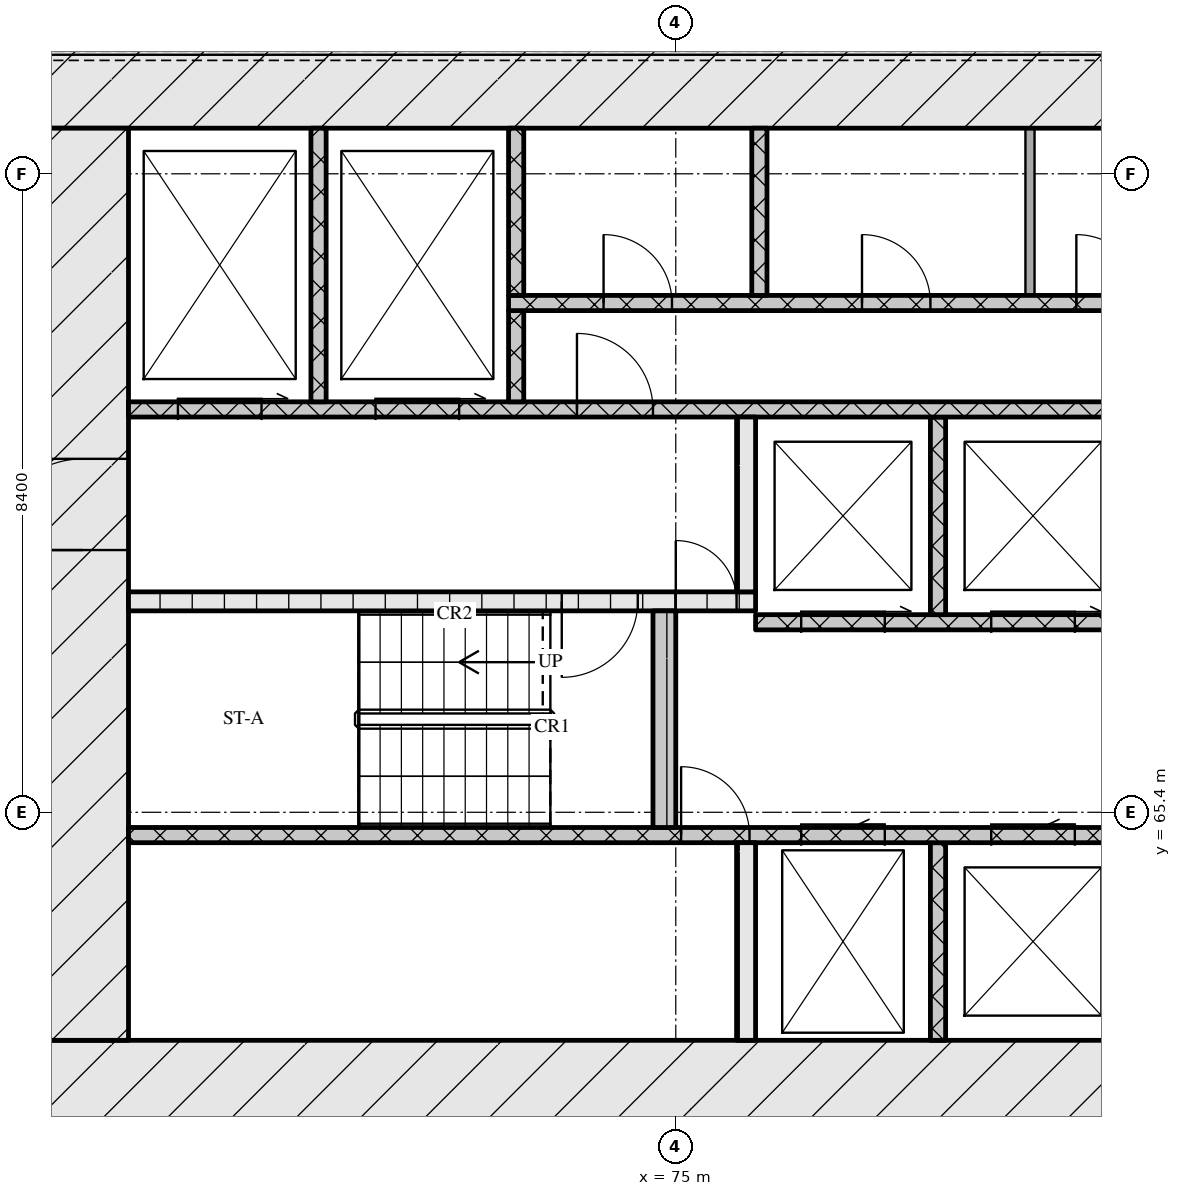
"""IFC4 building model, lengths in metres.
Left out: names, types, materials, properties, quantities, classifications, styles, units other than length and angle.
Written with IfcOpenShell. Run it as: python <this file> out.ifc"""

import sys

from ifc_helpers import new_model, si_unit, direction, frame, frame_2d, origin, place, context, subcontext, project, spatial, rectangle, extrude, element, fill, save


model = new_model("IFC4")
c1 = context("Model", 3, precision=1e-05, world=origin(), true_north=direction((0.0, 1.0)))
c2 = subcontext(c1, "Body", "Model", "MODEL_VIEW")
j1 = project(units=[si_unit("LENGTHUNIT", "METRE"), si_unit("PLANEANGLEUNIT", "RADIAN")], contexts=[c1])
p1 = place(None, origin())
s1 = spatial("IfcSite", under=j1, at=p1, CompositionType="ELEMENT")
p2 = place(p1, origin())
s2 = spatial("IfcBuilding", under=s1, at=p2, CompositionType="ELEMENT")
p3 = place(p2, frame((0.0, 0.0, 55.2)))
s3 = spatial("IfcBuildingStorey", under=s2, at=p3, CompositionType="ELEMENT", Elevation=55.2)
p4 = place(p3, frame((66.6, 61.8, 0.0), z_axis=(0.0, 0.0, 1.0), x_axis=(1.0, 0.0, 0.0)))
e1 = element("IfcWall", 1, at=p4, inside=s3, PredefinedType="SOLIDWALL", context=c2, shape_type="SweptSolid", body=[
    extrude(rectangle(XDim=42.0, YDim=1.2, at=frame_2d((21.0, 0.0))), origin(), (0.0, 0.0, 1.0), 3.32),
])
p5 = place(p4, frame((21.35, 0.0, 0.0)))
e2 = element("IfcOpeningElement", 2, at=p5, cuts=e1, PredefinedType="OPENING", context=c2, shape_type="SweptSolid", body=[
    extrude(rectangle(XDim=1.8, YDim=2.1, at=frame_2d((0.9, 1.05))), frame((0.0, 0.61, 0.0), z_axis=(0.0, -1.0, 0.0), x_axis=(1.0, 0.0, 0.0)), (0.0, 0.0, 1.0), 1.22),
])
p6 = place(p3, frame((66.6, 75.0, 0.0), z_axis=(0.0, 0.0, 1.0), x_axis=(1.0, 0.0, 0.0)))
e3 = element("IfcWall", 3, at=p6, inside=s3, PredefinedType="SOLIDWALL", context=c2, shape_type="SweptSolid", body=[
    extrude(rectangle(XDim=42.0, YDim=1.2, at=frame_2d((21.0, 0.0))), origin(), (0.0, 0.0, 1.0), 3.32),
])
p7 = place(p3, frame((67.2, 62.4, 0.0), z_axis=(0.0, 0.0, 1.0), x_axis=(0.0, 1.0, 0.0)))
e4 = element("IfcWall", 4, at=p7, inside=s3, PredefinedType="SOLIDWALL", context=c2, shape_type="SweptSolid", body=[
    extrude(rectangle(XDim=12.0, YDim=1.2, at=frame_2d((6.0, 0.0))), origin(), (0.0, 0.0, 1.0), 3.32),
])
p8 = place(p7, frame((6.45, 0.0, 0.0)))
e5 = element("IfcOpeningElement", 5, at=p8, cuts=e4, PredefinedType="OPENING", context=c2, shape_type="SweptSolid", body=[
    extrude(rectangle(XDim=1.2, YDim=2.1, at=frame_2d((0.6, 1.05))), frame((0.0, 0.61, 0.0), z_axis=(0.0, -1.0, 0.0), x_axis=(1.0, 0.0, 0.0)), (0.0, 0.0, 1.0), 1.22),
])
p9 = place(p3, frame((75.925, 62.4, 0.0), z_axis=(0.0, 0.0, 1.0), x_axis=(0.0, 1.0, 0.0)))
e6 = element("IfcWall", 6, at=p9, inside=s3, PredefinedType="SOLIDWALL", context=c2, shape_type="SweptSolid", body=[
    extrude(rectangle(XDim=2.6, YDim=0.25, at=frame_2d((1.3, 0.0))), origin(), (0.0, 0.0, 1.0), 3.32),
])
p10 = place(p3, frame((78.45, 62.4, 0.0), z_axis=(0.0, 0.0, 1.0), x_axis=(0.0, 1.0, 0.0)))
e7 = element("IfcWall", 7, at=p10, inside=s3, PredefinedType="SOLIDWALL", context=c2, shape_type="SweptSolid", body=[
    extrude(rectangle(XDim=2.6, YDim=0.2, at=frame_2d((1.3, 0.0))), origin(), (0.0, 0.0, 1.0), 3.32),
])
p11 = place(p3, frame((67.8, 65.1, 0.0), z_axis=(0.0, 0.0, 1.0), x_axis=(1.0, 0.0, 0.0)))
e8 = element("IfcWall", 8, at=p11, inside=s3, PredefinedType="SOLIDWALL", context=c2, shape_type="SweptSolid", body=[
    extrude(rectangle(XDim=18.5, YDim=0.2, at=frame_2d((9.25, 0.0))), origin(), (0.0, 0.0, 1.0), 3.32),
])
p12 = place(p11, frame((7.27, 0.0, 0.0)))
e9 = element("IfcOpeningElement", 9, at=p12, cuts=e8, PredefinedType="OPENING", context=c2, shape_type="SweptSolid", body=[
    extrude(rectangle(XDim=0.9, YDim=2.1, at=frame_2d((0.45, 1.05))), frame((0.0, 0.11, 0.0), z_axis=(0.0, -1.0, 0.0), x_axis=(1.0, 0.0, 0.0)), (0.0, 0.0, 1.0), 0.22),
])
p13 = place(p11, frame((8.85, 0.0, 0.0)))
e10 = element("IfcOpeningElement", 10, at=p13, cuts=e8, PredefinedType="OPENING", context=c2, shape_type="SweptSolid", body=[
    extrude(rectangle(XDim=1.1, YDim=2.1, at=frame_2d((0.55, 1.05))), frame((0.0, 0.11, 0.0), z_axis=(0.0, -1.0, 0.0), x_axis=(1.0, 0.0, 0.0)), (0.0, 0.0, 1.0), 0.22),
])
p14 = place(p11, frame((11.35, 0.0, 0.0)))
e11 = element("IfcOpeningElement", 11, at=p14, cuts=e8, PredefinedType="OPENING", context=c2, shape_type="SweptSolid", body=[
    extrude(rectangle(XDim=1.1, YDim=2.1, at=frame_2d((0.55, 1.05))), frame((0.0, 0.11, 0.0), z_axis=(0.0, -1.0, 0.0), x_axis=(1.0, 0.0, 0.0)), (0.0, 0.0, 1.0), 0.22),
])
p15 = place(p11, frame((13.85, 0.0, 0.0)))
e12 = element("IfcOpeningElement", 12, at=p15, cuts=e8, PredefinedType="OPENING", context=c2, shape_type="SweptSolid", body=[
    extrude(rectangle(XDim=1.1, YDim=2.1, at=frame_2d((0.55, 1.05))), frame((0.0, 0.11, 0.0), z_axis=(0.0, -1.0, 0.0), x_axis=(1.0, 0.0, 0.0)), (0.0, 0.0, 1.0), 0.22),
])
p16 = place(p11, frame((16.7, 0.0, 0.0)))
e13 = element("IfcOpeningElement", 13, at=p16, cuts=e8, PredefinedType="OPENING", context=c2, shape_type="SweptSolid", body=[
    extrude(rectangle(XDim=0.9, YDim=2.1, at=frame_2d((0.45, 1.05))), frame((0.0, 0.11, 0.0), z_axis=(0.0, -1.0, 0.0), x_axis=(1.0, 0.0, 0.0)), (0.0, 0.0, 1.0), 0.22),
])
p17 = place(p3, frame((74.85, 65.2, 0.0), z_axis=(0.0, 0.0, 1.0), x_axis=(0.0, 1.0, 0.0)))
e14 = element("IfcWall", 14, at=p17, inside=s3, PredefinedType="SOLIDWALL", context=c2, shape_type="SweptSolid", body=[
    extrude(rectangle(XDim=2.85, YDim=0.3, at=frame_2d((1.425, 0.0))), origin(), (0.0, 0.0, 1.0), 3.32),
])
p18 = place(p3, frame((76.05, 67.9, 0.0), z_axis=(0.0, 0.0, 1.0), x_axis=(1.0, 0.0, 0.0)))
e15 = element("IfcWall", 15, at=p18, inside=s3, PredefinedType="SOLIDWALL", context=c2, shape_type="SweptSolid", body=[
    extrude(rectangle(XDim=23.1, YDim=0.2, at=frame_2d((11.55, 0.0))), origin(), (0.0, 0.0, 1.0), 3.32),
])
p19 = place(p18, frame((0.6, 0.0, 0.0)))
e16 = element("IfcOpeningElement", 16, at=p19, cuts=e15, PredefinedType="OPENING", context=c2, shape_type="SweptSolid", body=[
    extrude(rectangle(XDim=1.1, YDim=2.1, at=frame_2d((0.55, 1.05))), frame((0.0, 0.11, 0.0), z_axis=(0.0, -1.0, 0.0), x_axis=(1.0, 0.0, 0.0)), (0.0, 0.0, 1.0), 0.22),
])
p20 = place(p18, frame((3.1, 0.0, 0.0)))
e17 = element("IfcOpeningElement", 17, at=p20, cuts=e15, PredefinedType="OPENING", context=c2, shape_type="SweptSolid", body=[
    extrude(rectangle(XDim=1.1, YDim=2.1, at=frame_2d((0.55, 1.05))), frame((0.0, 0.11, 0.0), z_axis=(0.0, -1.0, 0.0), x_axis=(1.0, 0.0, 0.0)), (0.0, 0.0, 1.0), 0.22),
])
p21 = place(p18, frame((5.6, 0.0, 0.0)))
e18 = element("IfcOpeningElement", 18, at=p21, cuts=e15, PredefinedType="OPENING", context=c2, shape_type="SweptSolid", body=[
    extrude(rectangle(XDim=1.1, YDim=2.1, at=frame_2d((0.55, 1.05))), frame((0.0, 0.11, 0.0), z_axis=(0.0, -1.0, 0.0), x_axis=(1.0, 0.0, 0.0)), (0.0, 0.0, 1.0), 0.22),
])
p22 = place(p18, frame((9.7, 0.0, 0.0)))
e19 = element("IfcOpeningElement", 19, at=p22, cuts=e15, PredefinedType="OPENING", context=c2, shape_type="SweptSolid", body=[
    extrude(rectangle(XDim=0.9, YDim=2.1, at=frame_2d((0.45, 1.05))), frame((0.0, 0.11, 0.0), z_axis=(0.0, -1.0, 0.0), x_axis=(1.0, 0.0, 0.0)), (0.0, 0.0, 1.0), 0.22),
])
p23 = place(p18, frame((13.55, 0.0, 0.0)))
e20 = element("IfcOpeningElement", 20, at=p23, cuts=e15, PredefinedType="OPENING", context=c2, shape_type="SweptSolid", body=[
    extrude(rectangle(XDim=1.0, YDim=2.1, at=frame_2d((0.5, 1.05))), frame((0.0, 0.11, 0.0), z_axis=(0.0, -1.0, 0.0), x_axis=(1.0, 0.0, 0.0)), (0.0, 0.0, 1.0), 0.22),
])
p24 = place(p3, frame((78.45, 68.0, 0.0), z_axis=(0.0, 0.0, 1.0), x_axis=(0.0, 1.0, 0.0)))
e21 = element("IfcWall", 21, at=p24, inside=s3, PredefinedType="SOLIDWALL", context=c2, shape_type="SweptSolid", body=[
    extrude(rectangle(XDim=2.6, YDim=0.2, at=frame_2d((1.3, 0.0))), origin(), (0.0, 0.0, 1.0), 3.32),
])
p25 = place(p3, frame((67.8, 68.175, 0.0), z_axis=(0.0, 0.0, 1.0), x_axis=(1.0, 0.0, 0.0)))
e22 = element("IfcWall", 22, at=p25, inside=s3, PredefinedType="SOLIDWALL", context=c2, shape_type="SweptSolid", body=[
    extrude(rectangle(XDim=8.25, YDim=0.25, at=frame_2d((4.125, 0.0))), origin(), (0.0, 0.0, 1.0), 3.32),
])
p26 = place(p25, frame((5.7, 0.0, 0.0)))
e23 = element("IfcOpeningElement", 23, at=p26, cuts=e22, PredefinedType="OPENING", context=c2, shape_type="SweptSolid", body=[
    extrude(rectangle(XDim=1.0, YDim=2.1, at=frame_2d((0.5, 1.05))), frame((0.0, 0.135, 0.0), z_axis=(0.0, -1.0, 0.0), x_axis=(1.0, 0.0, 0.0)), (0.0, 0.0, 1.0), 0.27),
])
p27 = place(p25, frame((7.2, 0.0, 0.0)))
e24 = element("IfcOpeningElement", 24, at=p27, cuts=e22, PredefinedType="OPENING", context=c2, shape_type="SweptSolid", body=[
    extrude(rectangle(XDim=0.8, YDim=2.1, at=frame_2d((0.4, 1.05))), frame((0.0, 0.135, 0.0), z_axis=(0.0, -1.0, 0.0), x_axis=(1.0, 0.0, 0.0)), (0.0, 0.0, 1.0), 0.27),
])
p28 = place(p3, frame((75.925, 68.3, 0.0), z_axis=(0.0, 0.0, 1.0), x_axis=(0.0, 1.0, 0.0)))
e25 = element("IfcWall", 25, at=p28, inside=s3, PredefinedType="SOLIDWALL", context=c2, shape_type="SweptSolid", body=[
    extrude(rectangle(XDim=2.3, YDim=0.25, at=frame_2d((1.15, 0.0))), origin(), (0.0, 0.0, 1.0), 3.32),
])
p29 = place(p3, frame((67.8, 70.7, 0.0), z_axis=(0.0, 0.0, 1.0), x_axis=(1.0, 0.0, 0.0)))
e26 = element("IfcWall", 26, at=p29, inside=s3, PredefinedType="SOLIDWALL", context=c2, shape_type="SweptSolid", body=[
    extrude(rectangle(XDim=39.6, YDim=0.2, at=frame_2d((19.8, 0.0))), origin(), (0.0, 0.0, 1.0), 3.32),
])
p30 = place(p29, frame((0.65, 0.0, 0.0)))
e27 = element("IfcOpeningElement", 27, at=p30, cuts=e26, PredefinedType="OPENING", context=c2, shape_type="SweptSolid", body=[
    extrude(rectangle(XDim=1.1, YDim=2.1, at=frame_2d((0.55, 1.05))), frame((0.0, 0.11, 0.0), z_axis=(0.0, -1.0, 0.0), x_axis=(1.0, 0.0, 0.0)), (0.0, 0.0, 1.0), 0.22),
])
p31 = place(p29, frame((3.25, 0.0, 0.0)))
e28 = element("IfcOpeningElement", 28, at=p31, cuts=e26, PredefinedType="OPENING", context=c2, shape_type="SweptSolid", body=[
    extrude(rectangle(XDim=1.1, YDim=2.1, at=frame_2d((0.55, 1.05))), frame((0.0, 0.11, 0.0), z_axis=(0.0, -1.0, 0.0), x_axis=(1.0, 0.0, 0.0)), (0.0, 0.0, 1.0), 0.22),
])
p32 = place(p29, frame((5.9, 0.0, 0.0)))
e29 = element("IfcOpeningElement", 29, at=p32, cuts=e26, PredefinedType="OPENING", context=c2, shape_type="SweptSolid", body=[
    extrude(rectangle(XDim=1.0, YDim=2.1, at=frame_2d((0.5, 1.05))), frame((0.0, 0.11, 0.0), z_axis=(0.0, -1.0, 0.0), x_axis=(1.0, 0.0, 0.0)), (0.0, 0.0, 1.0), 0.22),
])
p33 = place(p29, frame((21.7, 0.0, 0.0)))
e30 = element("IfcOpeningElement", 30, at=p33, cuts=e26, PredefinedType="OPENING", context=c2, shape_type="SweptSolid", body=[
    extrude(rectangle(XDim=1.0, YDim=2.1, at=frame_2d((0.5, 1.05))), frame((0.0, 0.11, 0.0), z_axis=(0.0, -1.0, 0.0), x_axis=(1.0, 0.0, 0.0)), (0.0, 0.0, 1.0), 0.22),
])
p34 = place(p29, frame((32.7, 0.0, 0.0)))
e31 = element("IfcOpeningElement", 31, at=p34, cuts=e26, PredefinedType="OPENING", context=c2, shape_type="SweptSolid", body=[
    extrude(rectangle(XDim=1.0, YDim=2.1, at=frame_2d((0.5, 1.05))), frame((0.0, 0.11, 0.0), z_axis=(0.0, -1.0, 0.0), x_axis=(1.0, 0.0, 0.0)), (0.0, 0.0, 1.0), 0.22),
])
p35 = place(p29, frame((35.25, 0.0, 0.0)))
e32 = element("IfcOpeningElement", 32, at=p35, cuts=e26, PredefinedType="OPENING", context=c2, shape_type="SweptSolid", body=[
    extrude(rectangle(XDim=1.1, YDim=2.1, at=frame_2d((0.55, 1.05))), frame((0.0, 0.11, 0.0), z_axis=(0.0, -1.0, 0.0), x_axis=(1.0, 0.0, 0.0)), (0.0, 0.0, 1.0), 0.22),
])
p36 = place(p29, frame((37.85, 0.0, 0.0)))
e33 = element("IfcOpeningElement", 33, at=p36, cuts=e26, PredefinedType="OPENING", context=c2, shape_type="SweptSolid", body=[
    extrude(rectangle(XDim=1.1, YDim=2.1, at=frame_2d((0.55, 1.05))), frame((0.0, 0.11, 0.0), z_axis=(0.0, -1.0, 0.0), x_axis=(1.0, 0.0, 0.0)), (0.0, 0.0, 1.0), 0.22),
])
p37 = place(p3, frame((70.3, 70.8, 0.0), z_axis=(0.0, 0.0, 1.0), x_axis=(0.0, 1.0, 0.0)))
e34 = element("IfcWall", 34, at=p37, inside=s3, PredefinedType="SOLIDWALL", context=c2, shape_type="SweptSolid", body=[
    extrude(rectangle(XDim=3.6, YDim=0.2, at=frame_2d((1.8, 0.0))), origin(), (0.0, 0.0, 1.0), 3.32),
])
p38 = place(p3, frame((72.9, 70.8, 0.0), z_axis=(0.0, 0.0, 1.0), x_axis=(0.0, 1.0, 0.0)))
e35 = element("IfcWall", 35, at=p38, inside=s3, PredefinedType="SOLIDWALL", context=c2, shape_type="SweptSolid", body=[
    extrude(rectangle(XDim=1.2, YDim=0.2, at=frame_2d((0.6, 0.0))), origin(), (0.0, 0.0, 1.0), 3.32),
])
p39 = place(p3, frame((72.8, 72.1, 0.0), z_axis=(0.0, 0.0, 1.0), x_axis=(1.0, 0.0, 0.0)))
e36 = element("IfcWall", 36, at=p39, inside=s3, PredefinedType="SOLIDWALL", context=c2, shape_type="SweptSolid", body=[
    extrude(rectangle(XDim=11.0, YDim=0.2, at=frame_2d((5.5, 0.0))), origin(), (0.0, 0.0, 1.0), 3.32),
])
p40 = place(p39, frame((1.25, 0.0, 0.0)))
e37 = element("IfcOpeningElement", 37, at=p40, cuts=e36, PredefinedType="OPENING", context=c2, shape_type="SweptSolid", body=[
    extrude(rectangle(XDim=0.9, YDim=2.1, at=frame_2d((0.45, 1.05))), frame((0.0, 0.11, 0.0), z_axis=(0.0, -1.0, 0.0), x_axis=(1.0, 0.0, 0.0)), (0.0, 0.0, 1.0), 0.22),
])
p41 = place(p39, frame((4.65, 0.0, 0.0)))
e38 = element("IfcOpeningElement", 38, at=p41, cuts=e36, PredefinedType="OPENING", context=c2, shape_type="SweptSolid", body=[
    extrude(rectangle(XDim=0.9, YDim=2.1, at=frame_2d((0.45, 1.05))), frame((0.0, 0.11, 0.0), z_axis=(0.0, -1.0, 0.0), x_axis=(1.0, 0.0, 0.0)), (0.0, 0.0, 1.0), 0.22),
])
p42 = place(p39, frame((7.47, 0.0, 0.0)))
e39 = element("IfcOpeningElement", 39, at=p42, cuts=e36, PredefinedType="OPENING", context=c2, shape_type="SweptSolid", body=[
    extrude(rectangle(XDim=0.9, YDim=2.1, at=frame_2d((0.45, 1.05))), frame((0.0, 0.11, 0.0), z_axis=(0.0, -1.0, 0.0), x_axis=(1.0, 0.0, 0.0)), (0.0, 0.0, 1.0), 0.22),
])
p43 = place(p39, frame((9.445, 0.0, 0.0)))
e40 = element("IfcOpeningElement", 40, at=p43, cuts=e36, PredefinedType="OPENING", context=c2, shape_type="SweptSolid", body=[
    extrude(rectangle(XDim=0.9, YDim=2.1, at=frame_2d((0.45, 1.05))), frame((0.0, 0.11, 0.0), z_axis=(0.0, -1.0, 0.0), x_axis=(1.0, 0.0, 0.0)), (0.0, 0.0, 1.0), 0.22),
])
for number, where, z_axis, x_axis in (
    (41, (72.9, 72.2, 0.0), (0.0, 0.0, 1.0), (0.0, 1.0, 0.0)),
    (42, (76.1, 72.2, 0.0), (0.0, 0.0, 1.0), (0.0, 1.0, 0.0)),
):
    element("IfcWall", number, at=place(p3, frame(where, z_axis=z_axis, x_axis=x_axis)), inside=s3, PredefinedType="SOLIDWALL", context=c2, shape_type="SweptSolid", body=[
        extrude(rectangle(XDim=2.2, YDim=0.2, at=frame_2d((1.1, 0.0))), origin(), (0.0, 0.0, 1.0), 3.32),
    ])
p44 = place(p3, frame((79.66, 72.2, 0.0), z_axis=(0.0, 0.0, 1.0), x_axis=(0.0, 1.0, 0.0)))
e43 = element("IfcWall", 43, at=p44, inside=s3, PredefinedType="PARTITIONING", context=c2, shape_type="SweptSolid", body=[
    extrude(rectangle(XDim=2.2, YDim=0.12, at=frame_2d((1.1, 0.0))), origin(), (0.0, 0.0, 1.0), 3.32),
])
p45 = place(p12, origin())
e44 = element("IfcDoor", 44, at=p45, inside=s3, OperationType="SINGLE_SWING_LEFT", PredefinedType="DOOR", context=c2, shape_type="SweptSolid", body=[
    extrude(rectangle(XDim=0.9, YDim=2.1, at=frame_2d((0.45, 1.05))), frame((0.0, 0.025, 0.0), z_axis=(0.0, -1.0, 0.0), x_axis=(1.0, 0.0, 0.0)), (0.0, 0.0, 1.0), 0.05),
])
fill(e9, e44)
p46 = place(p13, origin())
e45 = element("IfcDoor", 45, at=p46, inside=s3, OperationType="SLIDING_TO_LEFT", PredefinedType="DOOR", context=c2, shape_type="SweptSolid", body=[
    extrude(rectangle(XDim=1.1, YDim=2.1, at=frame_2d((0.55, 1.05))), frame((0.0, 0.025, 0.0), z_axis=(0.0, -1.0, 0.0), x_axis=(1.0, 0.0, 0.0)), (0.0, 0.0, 1.0), 0.05),
])
fill(e10, e45)
p47 = place(p14, origin())
e46 = element("IfcDoor", 46, at=p47, inside=s3, OperationType="SLIDING_TO_LEFT", PredefinedType="DOOR", context=c2, shape_type="SweptSolid", body=[
    extrude(rectangle(XDim=1.1, YDim=2.1, at=frame_2d((0.55, 1.05))), frame((0.0, 0.025, 0.0), z_axis=(0.0, -1.0, 0.0), x_axis=(1.0, 0.0, 0.0)), (0.0, 0.0, 1.0), 0.05),
])
fill(e11, e46)
p48 = place(p19, origin())
e47 = element("IfcDoor", 47, at=p48, inside=s3, OperationType="SLIDING_TO_RIGHT", PredefinedType="DOOR", context=c2, shape_type="SweptSolid", body=[
    extrude(rectangle(XDim=1.1, YDim=2.1, at=frame_2d((0.55, 1.05))), frame((0.0, 0.025, 0.0), z_axis=(0.0, -1.0, 0.0), x_axis=(1.0, 0.0, 0.0)), (0.0, 0.0, 1.0), 0.05),
])
fill(e16, e47)
p49 = place(p20, origin())
e48 = element("IfcDoor", 48, at=p49, inside=s3, OperationType="SLIDING_TO_RIGHT", PredefinedType="DOOR", context=c2, shape_type="SweptSolid", body=[
    extrude(rectangle(XDim=1.1, YDim=2.1, at=frame_2d((0.55, 1.05))), frame((0.0, 0.025, 0.0), z_axis=(0.0, -1.0, 0.0), x_axis=(1.0, 0.0, 0.0)), (0.0, 0.0, 1.0), 0.05),
])
fill(e17, e48)
p50 = place(p26, origin())
e49 = element("IfcDoor", 49, at=p50, inside=s3, OperationType="SINGLE_SWING_RIGHT", PredefinedType="DOOR", context=c2, shape_type="SweptSolid", body=[
    extrude(rectangle(XDim=1.0, YDim=2.1, at=frame_2d((0.5, 1.05))), frame((0.0, 0.025, 0.0), z_axis=(0.0, -1.0, 0.0), x_axis=(1.0, 0.0, 0.0)), (0.0, 0.0, 1.0), 0.05),
])
fill(e23, e49)
p51 = place(p27, origin())
e50 = element("IfcDoor", 50, at=p51, inside=s3, OperationType="SINGLE_SWING_LEFT", PredefinedType="DOOR", context=c2, shape_type="SweptSolid", body=[
    extrude(rectangle(XDim=0.8, YDim=2.1, at=frame_2d((0.4, 1.05))), frame((0.0, 0.025, 0.0), z_axis=(0.0, -1.0, 0.0), x_axis=(1.0, 0.0, 0.0)), (0.0, 0.0, 1.0), 0.05),
])
fill(e24, e50)
p52 = place(p8, origin())
e51 = element("IfcDoor", 51, at=p52, inside=s3, OperationType="SINGLE_SWING_LEFT", PredefinedType="DOOR", context=c2, shape_type="SweptSolid", body=[
    extrude(rectangle(XDim=1.2, YDim=2.1, at=frame_2d((0.6, 1.05))), frame((0.0, 0.025, 0.0), z_axis=(0.0, -1.0, 0.0), x_axis=(1.0, 0.0, 0.0)), (0.0, 0.0, 1.0), 0.05),
])
fill(e5, e51)
p53 = place(p30, origin())
e52 = element("IfcDoor", 52, at=p53, inside=s3, OperationType="SLIDING_TO_RIGHT", PredefinedType="DOOR", context=c2, shape_type="SweptSolid", body=[
    extrude(rectangle(XDim=1.1, YDim=2.1, at=frame_2d((0.55, 1.05))), frame((0.0, 0.025, 0.0), z_axis=(0.0, -1.0, 0.0), x_axis=(1.0, 0.0, 0.0)), (0.0, 0.0, 1.0), 0.05),
])
fill(e27, e52)
p54 = place(p31, origin())
e53 = element("IfcDoor", 53, at=p54, inside=s3, OperationType="SLIDING_TO_RIGHT", PredefinedType="DOOR", context=c2, shape_type="SweptSolid", body=[
    extrude(rectangle(XDim=1.1, YDim=2.1, at=frame_2d((0.55, 1.05))), frame((0.0, 0.025, 0.0), z_axis=(0.0, -1.0, 0.0), x_axis=(1.0, 0.0, 0.0)), (0.0, 0.0, 1.0), 0.05),
])
fill(e28, e53)
p55 = place(p32, origin())
e54 = element("IfcDoor", 54, at=p55, inside=s3, OperationType="SINGLE_SWING_LEFT", PredefinedType="DOOR", context=c2, shape_type="SweptSolid", body=[
    extrude(rectangle(XDim=1.0, YDim=2.1, at=frame_2d((0.5, 1.05))), frame((0.0, 0.025, 0.0), z_axis=(0.0, -1.0, 0.0), x_axis=(1.0, 0.0, 0.0)), (0.0, 0.0, 1.0), 0.05),
])
fill(e29, e54)
p56 = place(p40, origin())
e55 = element("IfcDoor", 55, at=p56, inside=s3, OperationType="SINGLE_SWING_LEFT", PredefinedType="DOOR", context=c2, shape_type="SweptSolid", body=[
    extrude(rectangle(XDim=0.9, YDim=2.1, at=frame_2d((0.45, 1.05))), frame((0.0, 0.025, 0.0), z_axis=(0.0, -1.0, 0.0), x_axis=(1.0, 0.0, 0.0)), (0.0, 0.0, 1.0), 0.05),
])
fill(e37, e55)
p57 = place(p41, origin())
e56 = element("IfcDoor", 56, at=p57, inside=s3, OperationType="SINGLE_SWING_LEFT", PredefinedType="DOOR", context=c2, shape_type="SweptSolid", body=[
    extrude(rectangle(XDim=0.9, YDim=2.1, at=frame_2d((0.45, 1.05))), frame((0.0, 0.025, 0.0), z_axis=(0.0, -1.0, 0.0), x_axis=(1.0, 0.0, 0.0)), (0.0, 0.0, 1.0), 0.05),
])
fill(e38, e56)
p58 = place(p42, origin())
e57 = element("IfcDoor", 57, at=p58, inside=s3, OperationType="SINGLE_SWING_LEFT", PredefinedType="DOOR", context=c2, shape_type="SweptSolid", body=[
    extrude(rectangle(XDim=0.9, YDim=2.1, at=frame_2d((0.45, 1.05))), frame((0.0, 0.025, 0.0), z_axis=(0.0, -1.0, 0.0), x_axis=(1.0, 0.0, 0.0)), (0.0, 0.0, 1.0), 0.05),
])
fill(e39, e57)
save(model, sys.argv[1])
